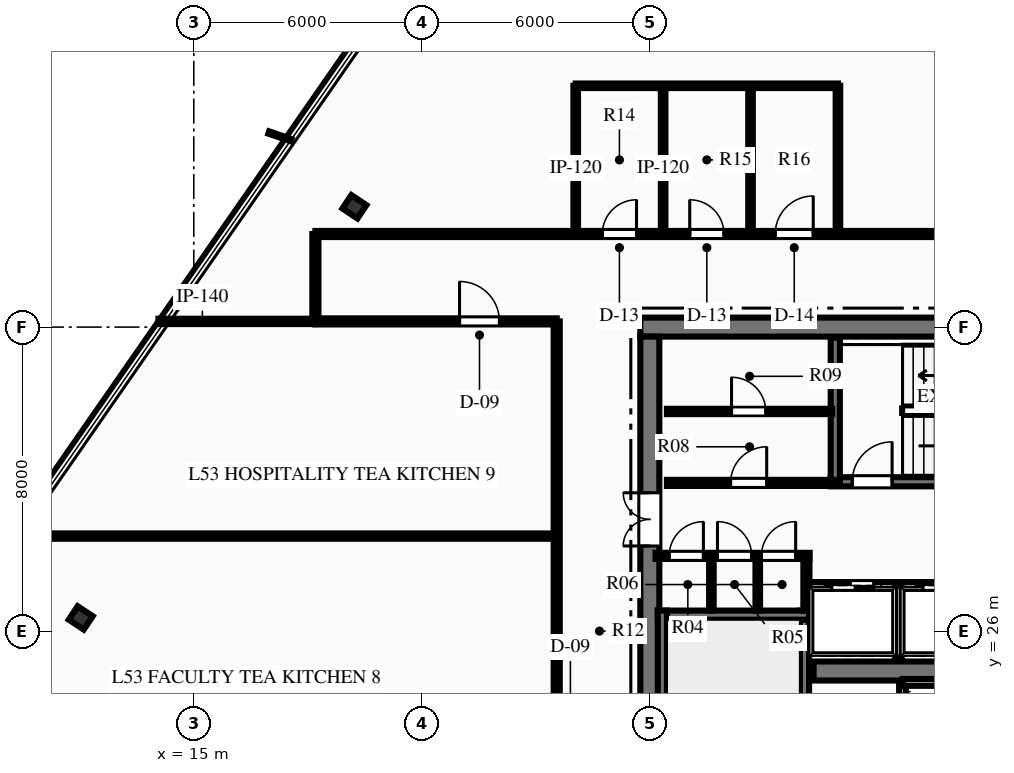
"""IFC4 building model, lengths in metres.
Left out: names, types, materials, properties, quantities, classifications, styles, units other than length and angle.
Written with IfcOpenShell. Run it as: python <this file> out.ifc"""

import sys

from ifc_helpers import new_model, si_unit, direction, frame, frame_2d, origin, origin_2d, place, context, subcontext, project, spatial, rectangle, i_section, extrude, element, fill, save


model = new_model("IFC4")
c1 = context("Model", 3, precision=1e-05, world=origin(), true_north=direction((0.0, 1.0)))
c2 = subcontext(c1, "Body", "Model", "MODEL_VIEW")
j1 = project(units=[si_unit("LENGTHUNIT", "METRE"), si_unit("PLANEANGLEUNIT", "RADIAN")], contexts=[c1])
p1 = place(None, origin())
s1 = spatial("IfcSite", under=j1, at=p1, CompositionType="ELEMENT")
p2 = place(p1, origin())
s2 = spatial("IfcBuilding", under=s1, at=p2, CompositionType="ELEMENT")
p3 = place(p2, frame((0.0, 0.0, 213.45)))
s3 = spatial("IfcBuildingStorey", under=s2, at=p3, CompositionType="ELEMENT", Elevation=213.45)
p4 = place(p3, frame((26.75, 34.0, 0.0), z_axis=(0.0, 0.0, 1.0), x_axis=(1.0, 0.0, 0.0)))
e1 = element("IfcWall", 1, at=p4, inside=s3, PredefinedType="SHEAR", context=c2, shape_type="SweptSolid", body=[
    extrude(rectangle(XDim=18.5, YDim=0.5, at=frame_2d((9.25, 0.0))), origin(), (0.0, 0.0, 1.0), 3.75),
])
p5 = place(p4, frame((13.935, 0.0, 0.0)))
e2 = element("IfcOpeningElement", 2, at=p5, cuts=e1, PredefinedType="OPENING", context=c2, shape_type="SweptSolid", body=[
    extrude(rectangle(XDim=1.1, YDim=2.15, at=frame_2d((0.55, 1.075))), frame((0.0, 0.26, 0.0), z_axis=(0.0, -1.0, 0.0), x_axis=(1.0, 0.0, 0.0)), (0.0, 0.0, 1.0), 0.52),
])
p6 = place(p4, frame((16.185, 0.0, 0.0)))
e3 = element("IfcOpeningElement", 3, at=p6, cuts=e1, PredefinedType="OPENING", context=c2, shape_type="SweptSolid", body=[
    extrude(rectangle(XDim=1.1, YDim=2.15, at=frame_2d((0.55, 1.075))), frame((0.0, 0.26, 0.0), z_axis=(0.0, -1.0, 0.0), x_axis=(1.0, 0.0, 0.0)), (0.0, 0.0, 1.0), 0.52),
])
p7 = place(p3, frame((27.0, 18.25, 0.0), z_axis=(0.0, 0.0, 1.0), x_axis=(0.0, 1.0, 0.0)))
e4 = element("IfcWall", 4, at=p7, inside=s3, PredefinedType="SHEAR", context=c2, shape_type="SweptSolid", body=[
    extrude(rectangle(XDim=15.5, YDim=0.5, at=frame_2d((7.75, 0.0))), origin(), (0.0, 0.0, 1.0), 3.75),
])
p8 = place(p7, frame((9.99, 0.0, 0.0)))
e5 = element("IfcOpeningElement", 5, at=p8, cuts=e4, PredefinedType="OPENING", context=c2, shape_type="SweptSolid", body=[
    extrude(rectangle(XDim=1.4, YDim=2.2, at=frame_2d((0.7, 1.1))), frame((0.0, 0.26, 0.0), z_axis=(0.0, -1.0, 0.0), x_axis=(1.0, 0.0, 0.0)), (0.0, 0.0, 1.0), 0.52),
])
p9 = place(p3, frame((31.31, 24.95, 0.0), z_axis=(0.0, 0.0, 1.0), x_axis=(1.0, 0.0, 0.0)))
e6 = element("IfcWall", 6, at=p9, inside=s3, PredefinedType="SHEAR", context=c2, shape_type="SweptSolid", body=[
    extrude(rectangle(XDim=9.38, YDim=0.5, at=frame_2d((4.69, 0.0))), origin(), (0.0, 0.0, 1.0), 3.75),
])
p10 = place(p3, frame((31.07, 18.28, 0.0), z_axis=(0.0, 0.0, 1.0), x_axis=(0.0, 1.0, 0.0)))
e7 = element("IfcWall", 7, at=p10, inside=s3, PredefinedType="SHEAR", context=c2, shape_type="SweptSolid", body=[
    extrude(rectangle(XDim=8.26, YDim=0.24, at=frame_2d((4.13, 0.0))), origin(), (0.0, 0.0, 1.0), 3.75),
])
p11 = place(p10, frame((0.365, 0.0, 0.0)))
e8 = element("IfcOpeningElement", 8, at=p11, cuts=e7, PredefinedType="OPENING", context=c2, shape_type="SweptSolid", body=[
    extrude(rectangle(XDim=1.05, YDim=2.15, at=frame_2d((0.525, 1.075))), frame((0.0, 0.13, 0.0), z_axis=(0.0, -1.0, 0.0), x_axis=(1.0, 0.0, 0.0)), (0.0, 0.0, 1.0), 0.26),
])
p12 = place(p3, frame((27.21, 26.42, 0.0), z_axis=(0.0, 0.0, 1.0), x_axis=(1.0, 0.0, 0.0)))
e9 = element("IfcWall", 9, at=p12, inside=s3, PredefinedType="SHEAR", context=c2, shape_type="SweptSolid", body=[
    extrude(rectangle(XDim=3.98, YDim=0.24, at=frame_2d((1.99, 0.0))), origin(), (0.0, 0.0, 1.0), 3.75),
])
p13 = place(p3, frame((27.33, 18.28, 0.0), z_axis=(0.0, 0.0, 1.0), x_axis=(0.0, 1.0, 0.0)))
e10 = element("IfcWall", 10, at=p13, inside=s3, PredefinedType="SHEAR", context=c2, shape_type="SweptSolid", body=[
    extrude(rectangle(XDim=8.26, YDim=0.24, at=frame_2d((4.13, 0.0))), origin(), (0.0, 0.0, 1.0), 3.75),
])
p14 = place(p3, frame((31.76, 29.93, 0.0), z_axis=(0.0, 0.0, 1.0), x_axis=(1.0, 0.0, 0.0)))
e11 = element("IfcWall", 11, at=p14, inside=s3, PredefinedType="SHEAR", context=c2, shape_type="SweptSolid", body=[
    extrude(rectangle(XDim=8.38, YDim=0.24, at=frame_2d((4.19, 0.0))), origin(), (0.0, 0.0, 1.0), 3.75),
])
p15 = place(p14, frame((0.565, 0.0, 0.0)))
e12 = element("IfcOpeningElement", 12, at=p15, cuts=e11, PredefinedType="OPENING", context=c2, shape_type="SweptSolid", body=[
    extrude(rectangle(XDim=1.05, YDim=2.15, at=frame_2d((0.525, 1.075))), frame((0.0, 0.13, 0.0), z_axis=(0.0, -1.0, 0.0), x_axis=(1.0, 0.0, 0.0)), (0.0, 0.0, 1.0), 0.26),
])
p16 = place(p3, frame((31.88, 29.93, 0.0), z_axis=(0.0, 0.0, 1.0), x_axis=(0.0, 1.0, 0.0)))
e13 = element("IfcWall", 13, at=p16, inside=s3, PredefinedType="SHEAR", context=c2, shape_type="SweptSolid", body=[
    extrude(rectangle(XDim=3.79, YDim=0.24, at=frame_2d((1.895, 0.0))), origin(), (0.0, 0.0, 1.0), 3.75),
])
for number, where, z_axis, x_axis in (
    (14, (19.226, 37.166, 0.0), (0.0, 0.0, 1.0), (0.554, 0.832, 0.0)),
    (15, (12.025, 26.347, 0.0), (0.0, 0.0, 1.0), (0.554, 0.832, 0.0)),
):
    element("IfcColumn", number, at=place(p3, frame(where, z_axis=z_axis, x_axis=x_axis)), inside=s3, PredefinedType="COLUMN", context=c2, shape_type="SweptSolid", body=[
        extrude(i_section(OverallWidth=0.424, OverallDepth=0.474, WebThickness=0.048, FlangeThickness=0.077, at=origin_2d()), origin(), (0.0, 0.0, 1.0), 3.75),
    ])
p17 = place(p3, frame((33.65, 22.05, 0.0), z_axis=(0.0, 0.0, 1.0), x_axis=(0.0, 1.0, 0.0)))
e16 = element("IfcWall", 16, at=p17, inside=s3, PredefinedType="PARTITIONING", context=c2, shape_type="SweptSolid", body=[
    extrude(rectangle(XDim=2.6, YDim=0.18, at=frame_2d((1.3, 0.0))), origin(), (0.0, 0.0, 1.0), 3.47),
])
p18 = place(p3, frame((33.65, 24.65, 0.0), z_axis=(0.0, 0.0, 1.0), x_axis=(1.0, 0.0, 0.0)))
e17 = element("IfcWall", 17, at=p18, inside=s3, PredefinedType="PARTITIONING", context=c2, shape_type="SweptSolid", body=[
    extrude(rectangle(XDim=1.8, YDim=0.18, at=frame_2d((0.9, 0.0))), origin(), (0.0, 0.0, 1.0), 3.47),
])
p19 = place(p3, frame((27.15, 27.98, 0.0), z_axis=(0.0, 0.0, 1.0), x_axis=(1.0, 0.0, 0.0)))
e18 = element("IfcWall", 18, at=p19, inside=s3, PredefinedType="PARTITIONING", context=c2, shape_type="SweptSolid", body=[
    extrude(rectangle(XDim=4.05, YDim=0.16, at=frame_2d((2.025, 0.0))), origin(), (0.0, 0.0, 1.0), 3.47),
])
p20 = place(p19, frame((0.36, 0.0, 0.0)))
e19 = element("IfcOpeningElement", 19, at=p20, cuts=e18, PredefinedType="OPENING", context=c2, shape_type="SweptSolid", body=[
    extrude(rectangle(XDim=0.9, YDim=2.15, at=frame_2d((0.45, 1.075))), frame((0.0, 0.09, 0.0), z_axis=(0.0, -1.0, 0.0), x_axis=(1.0, 0.0, 0.0)), (0.0, 0.0, 1.0), 0.18),
])
p21 = place(p19, frame((1.63, 0.0, 0.0)))
e20 = element("IfcOpeningElement", 20, at=p21, cuts=e18, PredefinedType="OPENING", context=c2, shape_type="SweptSolid", body=[
    extrude(rectangle(XDim=0.9, YDim=2.15, at=frame_2d((0.45, 1.075))), frame((0.0, 0.09, 0.0), z_axis=(0.0, -1.0, 0.0), x_axis=(1.0, 0.0, 0.0)), (0.0, 0.0, 1.0), 0.18),
])
p22 = place(p19, frame((2.788, 0.0, 0.0)))
e21 = element("IfcOpeningElement", 21, at=p22, cuts=e18, PredefinedType="OPENING", context=c2, shape_type="SweptSolid", body=[
    extrude(rectangle(XDim=0.9, YDim=2.15, at=frame_2d((0.45, 1.075))), frame((0.0, 0.09, 0.0), z_axis=(0.0, -1.0, 0.0), x_axis=(1.0, 0.0, 0.0)), (0.0, 0.0, 1.0), 0.18),
])
p23 = place(p3, frame((31.12, 26.54, 0.0), z_axis=(0.0, 0.0, 1.0), x_axis=(0.0, 1.0, 0.0)))
e22 = element("IfcWall", 22, at=p23, inside=s3, PredefinedType="PARTITIONING", context=c2, shape_type="SweptSolid", body=[
    extrude(rectangle(XDim=1.51, YDim=0.16, at=frame_2d((0.755, 0.0))), origin(), (0.0, 0.0, 1.0), 3.47),
])
for number, where, z_axis, x_axis in (
    (23, (28.62, 26.54, 0.0), (0.0, 0.0, 1.0), (0.0, 1.0, 0.0)),
    (24, (29.84, 26.54, 0.0), (0.0, 0.0, 1.0), (0.0, 1.0, 0.0)),
):
    element("IfcWall", number, at=place(p3, frame(where, z_axis=z_axis, x_axis=x_axis)), inside=s3, PredefinedType="PARTITIONING", context=c2, shape_type="SweptSolid", body=[
        extrude(rectangle(XDim=1.44, YDim=0.12, at=frame_2d((0.72, 0.0))), origin(), (0.0, 0.0, 1.0), 3.47),
    ])
p24 = place(p3, frame((27.45, 29.9, 0.0), z_axis=(0.0, 0.0, 1.0), x_axis=(1.0, 0.0, 0.0)))
e25 = element("IfcWall", 25, at=p24, inside=s3, PredefinedType="PARTITIONING", context=c2, shape_type="SweptSolid", body=[
    extrude(rectangle(XDim=4.43, YDim=0.16, at=frame_2d((2.215, 0.0))), origin(), (0.0, 0.0, 1.0), 3.47),
])
p25 = place(p24, frame((1.675, 0.0, 0.0)))
e26 = element("IfcOpeningElement", 26, at=p25, cuts=e25, PredefinedType="OPENING", context=c2, shape_type="SweptSolid", body=[
    extrude(rectangle(XDim=0.95, YDim=2.15, at=frame_2d((0.475, 1.075))), frame((0.0, 0.09, 0.0), z_axis=(0.0, -1.0, 0.0), x_axis=(1.0, 0.0, 0.0)), (0.0, 0.0, 1.0), 0.18),
])
p26 = place(p3, frame((27.45, 31.78, 0.0), z_axis=(0.0, 0.0, 1.0), x_axis=(1.0, 0.0, 0.0)))
e27 = element("IfcWall", 27, at=p26, inside=s3, PredefinedType="PARTITIONING", context=c2, shape_type="SweptSolid", body=[
    extrude(rectangle(XDim=4.35, YDim=0.14, at=frame_2d((2.175, 0.0))), origin(), (0.0, 0.0, 1.0), 3.47),
])
p27 = place(p26, frame((1.7, 0.0, 0.0)))
e28 = element("IfcOpeningElement", 28, at=p27, cuts=e27, PredefinedType="OPENING", context=c2, shape_type="SweptSolid", body=[
    extrude(rectangle(XDim=0.9, YDim=2.15, at=frame_2d((0.45, 1.075))), frame((0.0, 0.08, 0.0), z_axis=(0.0, -1.0, 0.0), x_axis=(1.0, 0.0, 0.0)), (0.0, 0.0, 1.0), 0.16),
])
p28 = place(p3, frame((31.2, 27.2, 0.0), z_axis=(0.0, 0.0, 1.0), x_axis=(1.0, 0.0, 0.0)))
e29 = element("IfcWall", 29, at=p28, inside=s3, PredefinedType="PARTITIONING", context=c2, shape_type="SweptSolid", body=[
    extrude(rectangle(XDim=9.6, YDim=0.18, at=frame_2d((4.8, 0.0))), origin(), (0.0, 0.0, 1.0), 3.47),
])
p29 = place(p28, frame((0.59, 0.0, 0.0)))
e30 = element("IfcOpeningElement", 30, at=p29, cuts=e29, PredefinedType="OPENING", context=c2, shape_type="SweptSolid", body=[
    extrude(rectangle(XDim=1.1, YDim=2.15, at=frame_2d((0.55, 1.075))), frame((0.0, 0.1, 0.0), z_axis=(0.0, -1.0, 0.0), x_axis=(1.0, 0.0, 0.0)), (0.0, 0.0, 1.0), 0.2),
])
p30 = place(p28, frame((2.99, 0.0, 0.0)))
e31 = element("IfcOpeningElement", 31, at=p30, cuts=e29, PredefinedType="OPENING", context=c2, shape_type="SweptSolid", body=[
    extrude(rectangle(XDim=1.1, YDim=2.15, at=frame_2d((0.55, 1.075))), frame((0.0, 0.1, 0.0), z_axis=(0.0, -1.0, 0.0), x_axis=(1.0, 0.0, 0.0)), (0.0, 0.0, 1.0), 0.2),
])
p31 = place(p28, frame((5.51, 0.0, 0.0)))
e32 = element("IfcOpeningElement", 32, at=p31, cuts=e29, PredefinedType="OPENING", context=c2, shape_type="SweptSolid", body=[
    extrude(rectangle(XDim=1.1, YDim=2.15, at=frame_2d((0.55, 1.075))), frame((0.0, 0.1, 0.0), z_axis=(0.0, -1.0, 0.0), x_axis=(1.0, 0.0, 0.0)), (0.0, 0.0, 1.0), 0.2),
])
p32 = place(p28, frame((7.91, 0.0, 0.0)))
e33 = element("IfcOpeningElement", 33, at=p32, cuts=e29, PredefinedType="OPENING", context=c2, shape_type="SweptSolid", body=[
    extrude(rectangle(XDim=1.1, YDim=2.15, at=frame_2d((0.55, 1.075))), frame((0.0, 0.1, 0.0), z_axis=(0.0, -1.0, 0.0), x_axis=(1.0, 0.0, 0.0)), (0.0, 0.0, 1.0), 0.2),
])
p33 = place(p3, frame((33.54, 25.3, 0.0), z_axis=(0.0, 0.0, 1.0), x_axis=(0.0, 1.0, 0.0)))
e34 = element("IfcWall", 34, at=p33, inside=s3, PredefinedType="PARTITIONING", context=c2, shape_type="SweptSolid", body=[
    extrude(rectangle(XDim=1.9, YDim=0.18, at=frame_2d((0.95, 0.0))), origin(), (0.0, 0.0, 1.0), 3.47),
])
p34 = place(p3, frame((18.2, 36.45, 0.0), z_axis=(0.0, 0.0, 1.0), x_axis=(1.0, 0.0, 0.0)))
e35 = element("IfcWall", 35, at=p34, inside=s3, PredefinedType="PARTITIONING", context=c2, shape_type="SweptSolid", body=[
    extrude(rectangle(XDim=35.6, YDim=0.16, at=frame_2d((17.8, 0.0))), origin(), (0.0, 0.0, 1.0), 2.849),
])
p35 = place(p34, frame((7.55, 0.0, 0.0)))
e36 = element("IfcOpeningElement", 36, at=p35, cuts=e35, PredefinedType="OPENING", context=c2, shape_type="SweptSolid", body=[
    extrude(rectangle(XDim=0.9, YDim=2.15, at=frame_2d((0.45, 1.075))), frame((0.0, 0.09, 0.0), z_axis=(0.0, -1.0, 0.0), x_axis=(1.0, 0.0, 0.0)), (0.0, 0.0, 1.0), 0.18),
])
p36 = place(p34, frame((9.85, 0.0, 0.0)))
e37 = element("IfcOpeningElement", 37, at=p36, cuts=e35, PredefinedType="OPENING", context=c2, shape_type="SweptSolid", body=[
    extrude(rectangle(XDim=0.9, YDim=2.15, at=frame_2d((0.45, 1.075))), frame((0.0, 0.09, 0.0), z_axis=(0.0, -1.0, 0.0), x_axis=(1.0, 0.0, 0.0)), (0.0, 0.0, 1.0), 0.18),
])
p37 = place(p34, frame((12.1, 0.0, 0.0)))
e38 = element("IfcOpeningElement", 38, at=p37, cuts=e35, PredefinedType="OPENING", context=c2, shape_type="SweptSolid", body=[
    extrude(rectangle(XDim=1.0, YDim=2.15, at=frame_2d((0.5, 1.075))), frame((0.0, 0.09, 0.0), z_axis=(0.0, -1.0, 0.0), x_axis=(1.0, 0.0, 0.0)), (0.0, 0.0, 1.0), 0.18),
])
p38 = place(p34, frame((17.01, 0.0, 0.0)))
e39 = element("IfcOpeningElement", 39, at=p38, cuts=e35, PredefinedType="OPENING", context=c2, shape_type="SweptSolid", body=[
    extrude(rectangle(XDim=1.05, YDim=2.15, at=frame_2d((0.525, 1.075))), frame((0.0, 0.09, 0.0), z_axis=(0.0, -1.0, 0.0), x_axis=(1.0, 0.0, 0.0)), (0.0, 0.0, 1.0), 0.18),
])
p39 = place(p34, frame((25.125, 0.0, 0.0)))
e40 = element("IfcOpeningElement", 40, at=p39, cuts=e35, PredefinedType="OPENING", context=c2, shape_type="SweptSolid", body=[
    extrude(rectangle(XDim=1.05, YDim=2.15, at=frame_2d((0.525, 1.075))), frame((0.0, 0.09, 0.0), z_axis=(0.0, -1.0, 0.0), x_axis=(1.0, 0.0, 0.0)), (0.0, 0.0, 1.0), 0.18),
])
p40 = place(p3, frame((18.2, 34.15, 0.0), z_axis=(0.0, 0.0, 1.0), x_axis=(1.0, 0.0, 0.0)))
e41 = element("IfcWall", 41, at=p40, inside=s3, PredefinedType="PARTITIONING", context=c2, shape_type="SweptSolid", body=[
    extrude(rectangle(XDim=6.35, YDim=0.16, at=frame_2d((3.175, 0.0))), origin(), (0.0, 0.0, 1.0), 3.47),
])
p41 = place(p40, frame((3.793, 0.0, 0.0)))
e42 = element("IfcOpeningElement", 42, at=p41, cuts=e41, PredefinedType="OPENING", context=c2, shape_type="SweptSolid", body=[
    extrude(rectangle(XDim=1.05, YDim=2.15, at=frame_2d((0.525, 1.075))), frame((0.0, 0.09, 0.0), z_axis=(0.0, -1.0, 0.0), x_axis=(1.0, 0.0, 0.0)), (0.0, 0.0, 1.0), 0.18),
])
p42 = place(p3, frame((24.55, 17.85, 0.0), z_axis=(0.0, 0.0, 1.0), x_axis=(0.0, 1.0, 0.0)))
e43 = element("IfcWall", 43, at=p42, inside=s3, PredefinedType="PARTITIONING", context=c2, shape_type="SweptSolid", body=[
    extrude(rectangle(XDim=16.3, YDim=0.16, at=frame_2d((8.15, 0.0))), origin(), (0.0, 0.0, 1.0), 3.47),
])
p43 = place(p42, frame((5.395, 0.0, 0.0)))
e44 = element("IfcOpeningElement", 44, at=p43, cuts=e43, PredefinedType="OPENING", context=c2, shape_type="SweptSolid", body=[
    extrude(rectangle(XDim=1.05, YDim=2.15, at=frame_2d((0.525, 1.075))), frame((0.0, 0.09, 0.0), z_axis=(0.0, -1.0, 0.0), x_axis=(1.0, 0.0, 0.0)), (0.0, 0.0, 1.0), 0.18),
])
p44 = place(p3, frame((18.2, 34.15, 0.0), z_axis=(0.0, 0.0, 1.0), x_axis=(0.0, 1.0, 0.0)))
e45 = element("IfcWall", 45, at=p44, inside=s3, PredefinedType="PARTITIONING", context=c2, shape_type="SweptSolid", body=[
    extrude(rectangle(XDim=2.3, YDim=0.16, at=frame_2d((1.15, 0.0))), origin(), (0.0, 0.0, 1.0), 3.47),
])
for number, where, z_axis, x_axis in (
    (46, (25.05, 36.45, 0.0), (0.0, 0.0, 1.0), (0.0, 1.0, 0.0)),
    (47, (27.35, 36.45, 0.0), (0.0, 0.0, 1.0), (0.0, 1.0, 0.0)),
    (48, (29.65, 36.45, 0.0), (0.0, 0.0, 1.0), (0.0, 1.0, 0.0)),
):
    element("IfcWall", number, at=place(p3, frame(where, z_axis=z_axis, x_axis=x_axis)), inside=s3, PredefinedType="PARTITIONING", context=c2, shape_type="SweptSolid", body=[
        extrude(rectangle(XDim=3.9, YDim=0.12, at=frame_2d((1.95, 0.0))), origin(), (0.0, 0.0, 1.0), 3.47),
    ])
p45 = place(p3, frame((31.95, 36.45, 0.0), z_axis=(0.0, 0.0, 1.0), x_axis=(0.0, 1.0, 0.0)))
e49 = element("IfcWall", 49, at=p45, inside=s3, PredefinedType="PARTITIONING", context=c2, shape_type="SweptSolid", body=[
    extrude(rectangle(XDim=3.9, YDim=0.12, at=frame_2d((1.95, 0.0))), origin(), (0.0, 0.0, 1.0), 2.849),
])
p46 = place(p3, frame((25.05, 40.35, 0.0), z_axis=(0.0, 0.0, 1.0), x_axis=(1.0, 0.0, 0.0)))
e50 = element("IfcWall", 50, at=p46, inside=s3, PredefinedType="PARTITIONING", context=c2, shape_type="SweptSolid", body=[
    extrude(rectangle(XDim=6.9, YDim=0.12, at=frame_2d((3.45, 0.0))), origin(), (0.0, 0.0, 1.0), 3.47),
])
p47 = place(p3, frame((14.069, 34.15, 0.0), z_axis=(0.0, 0.0, 1.0), x_axis=(1.0, 0.0, 0.0)))
e51 = element("IfcWall", 51, at=p47, inside=s3, PredefinedType="PARTITIONING", context=c2, shape_type="SweptSolid", body=[
    extrude(rectangle(XDim=4.131, YDim=0.14, at=frame_2d((2.065, 0.0))), origin(), (0.0, 0.0, 1.0), 3.47),
])
p48 = place(p3, frame((10.142, 28.5, 0.0), z_axis=(0.0, 0.0, 1.0), x_axis=(1.0, 0.0, 0.0)))
e52 = element("IfcWall", 52, at=p48, inside=s3, PredefinedType="PARTITIONING", context=c2, shape_type="SweptSolid", body=[
    extrude(rectangle(XDim=14.408, YDim=0.14, at=frame_2d((7.204, 0.0))), origin(), (0.0, 0.0, 1.0), 3.47),
])
p49 = place(p20, origin())
e53 = element("IfcDoor", 53, at=p49, inside=s3, OperationType="SINGLE_SWING_RIGHT", PredefinedType="DOOR", context=c2, shape_type="SweptSolid", body=[
    extrude(rectangle(XDim=0.9, YDim=2.15, at=frame_2d((0.45, 1.075))), frame((0.0, 0.025, 0.0), z_axis=(0.0, -1.0, 0.0), x_axis=(1.0, 0.0, 0.0)), (0.0, 0.0, 1.0), 0.05),
])
fill(e19, e53)
p50 = place(p21, origin())
e54 = element("IfcDoor", 54, at=p50, inside=s3, OperationType="SINGLE_SWING_LEFT", PredefinedType="DOOR", context=c2, shape_type="SweptSolid", body=[
    extrude(rectangle(XDim=0.9, YDim=2.15, at=frame_2d((0.45, 1.075))), frame((0.0, 0.025, 0.0), z_axis=(0.0, -1.0, 0.0), x_axis=(1.0, 0.0, 0.0)), (0.0, 0.0, 1.0), 0.05),
])
fill(e20, e54)
p51 = place(p22, origin())
e55 = element("IfcDoor", 55, at=p51, inside=s3, OperationType="SINGLE_SWING_RIGHT", PredefinedType="DOOR", context=c2, shape_type="SweptSolid", body=[
    extrude(rectangle(XDim=0.9, YDim=2.15, at=frame_2d((0.45, 1.075))), frame((0.0, 0.025, 0.0), z_axis=(0.0, -1.0, 0.0), x_axis=(1.0, 0.0, 0.0)), (0.0, 0.0, 1.0), 0.05),
])
fill(e21, e55)
p52 = place(p25, origin())
e56 = element("IfcDoor", 56, at=p52, inside=s3, OperationType="SINGLE_SWING_RIGHT", PredefinedType="DOOR", context=c2, shape_type="SweptSolid", body=[
    extrude(rectangle(XDim=0.95, YDim=2.15, at=frame_2d((0.475, 1.075))), frame((0.0, 0.025, 0.0), z_axis=(0.0, -1.0, 0.0), x_axis=(1.0, 0.0, 0.0)), (0.0, 0.0, 1.0), 0.05),
])
fill(e26, e56)
p53 = place(p27, origin())
e57 = element("IfcDoor", 57, at=p53, inside=s3, OperationType="SINGLE_SWING_LEFT", PredefinedType="DOOR", context=c2, shape_type="SweptSolid", body=[
    extrude(rectangle(XDim=0.9, YDim=2.15, at=frame_2d((0.45, 1.075))), frame((0.0, 0.025, 0.0), z_axis=(0.0, -1.0, 0.0), x_axis=(1.0, 0.0, 0.0)), (0.0, 0.0, 1.0), 0.05),
])
fill(e28, e57)
p54 = place(p15, origin())
e58 = element("IfcDoor", 58, at=p54, inside=s3, OperationType="SINGLE_SWING_RIGHT", PredefinedType="DOOR", context=c2, shape_type="SweptSolid", body=[
    extrude(rectangle(XDim=1.05, YDim=2.15, at=frame_2d((0.525, 1.075))), frame((0.0, 0.025, 0.0), z_axis=(0.0, -1.0, 0.0), x_axis=(1.0, 0.0, 0.0)), (0.0, 0.0, 1.0), 0.05),
])
fill(e12, e58)
p55 = place(p8, origin())
e59 = element("IfcDoor", 59, at=p55, inside=s3, OperationType="DOUBLE_DOOR_SINGLE_SWING", PredefinedType="DOOR", context=c2, shape_type="SweptSolid", body=[
    extrude(rectangle(XDim=1.4, YDim=2.2, at=frame_2d((0.7, 1.1))), frame((0.0, 0.025, 0.0), z_axis=(0.0, -1.0, 0.0), x_axis=(1.0, 0.0, 0.0)), (0.0, 0.0, 1.0), 0.05),
])
fill(e5, e59)
p56 = place(p35, origin())
e60 = element("IfcDoor", 60, at=p56, inside=s3, OperationType="SINGLE_SWING_RIGHT", PredefinedType="DOOR", context=c2, shape_type="SweptSolid", body=[
    extrude(rectangle(XDim=0.9, YDim=2.15, at=frame_2d((0.45, 1.075))), frame((0.0, 0.025, 0.0), z_axis=(0.0, -1.0, 0.0), x_axis=(1.0, 0.0, 0.0)), (0.0, 0.0, 1.0), 0.05),
])
fill(e36, e60)
p57 = place(p36, origin())
e61 = element("IfcDoor", 61, at=p57, inside=s3, OperationType="SINGLE_SWING_LEFT", PredefinedType="DOOR", context=c2, shape_type="SweptSolid", body=[
    extrude(rectangle(XDim=0.9, YDim=2.15, at=frame_2d((0.45, 1.075))), frame((0.0, 0.025, 0.0), z_axis=(0.0, -1.0, 0.0), x_axis=(1.0, 0.0, 0.0)), (0.0, 0.0, 1.0), 0.05),
])
fill(e37, e61)
p58 = place(p37, origin())
e62 = element("IfcDoor", 62, at=p58, inside=s3, OperationType="SINGLE_SWING_RIGHT", PredefinedType="DOOR", context=c2, shape_type="SweptSolid", body=[
    extrude(rectangle(XDim=1.0, YDim=2.15, at=frame_2d((0.5, 1.075))), frame((0.0, 0.025, 0.0), z_axis=(0.0, -1.0, 0.0), x_axis=(1.0, 0.0, 0.0)), (0.0, 0.0, 1.0), 0.05),
])
fill(e38, e62)
p59 = place(p41, origin())
e63 = element("IfcDoor", 63, at=p59, inside=s3, OperationType="SINGLE_SWING_LEFT", PredefinedType="DOOR", context=c2, shape_type="SweptSolid", body=[
    extrude(rectangle(XDim=1.05, YDim=2.15, at=frame_2d((0.525, 1.075))), frame((0.0, 0.025, 0.0), z_axis=(0.0, -1.0, 0.0), x_axis=(1.0, 0.0, 0.0)), (0.0, 0.0, 1.0), 0.05),
])
fill(e42, e63)
p60 = place(p29, origin())
e64 = element("IfcDoor", 64, at=p60, inside=s3, OperationType="SLIDING_TO_LEFT", PredefinedType="DOOR", context=c2, shape_type="SweptSolid", body=[
    extrude(rectangle(XDim=1.1, YDim=2.15, at=frame_2d((0.55, 1.075))), frame((0.0, 0.025, 0.0), z_axis=(0.0, -1.0, 0.0), x_axis=(1.0, 0.0, 0.0)), (0.0, 0.0, 1.0), 0.05),
])
fill(e30, e64)
p61 = place(p30, origin())
e65 = element("IfcDoor", 65, at=p61, inside=s3, OperationType="SLIDING_TO_LEFT", PredefinedType="DOOR", context=c2, shape_type="SweptSolid", body=[
    extrude(rectangle(XDim=1.1, YDim=2.15, at=frame_2d((0.55, 1.075))), frame((0.0, 0.025, 0.0), z_axis=(0.0, -1.0, 0.0), x_axis=(1.0, 0.0, 0.0)), (0.0, 0.0, 1.0), 0.05),
])
fill(e31, e65)
save(model, sys.argv[1])
